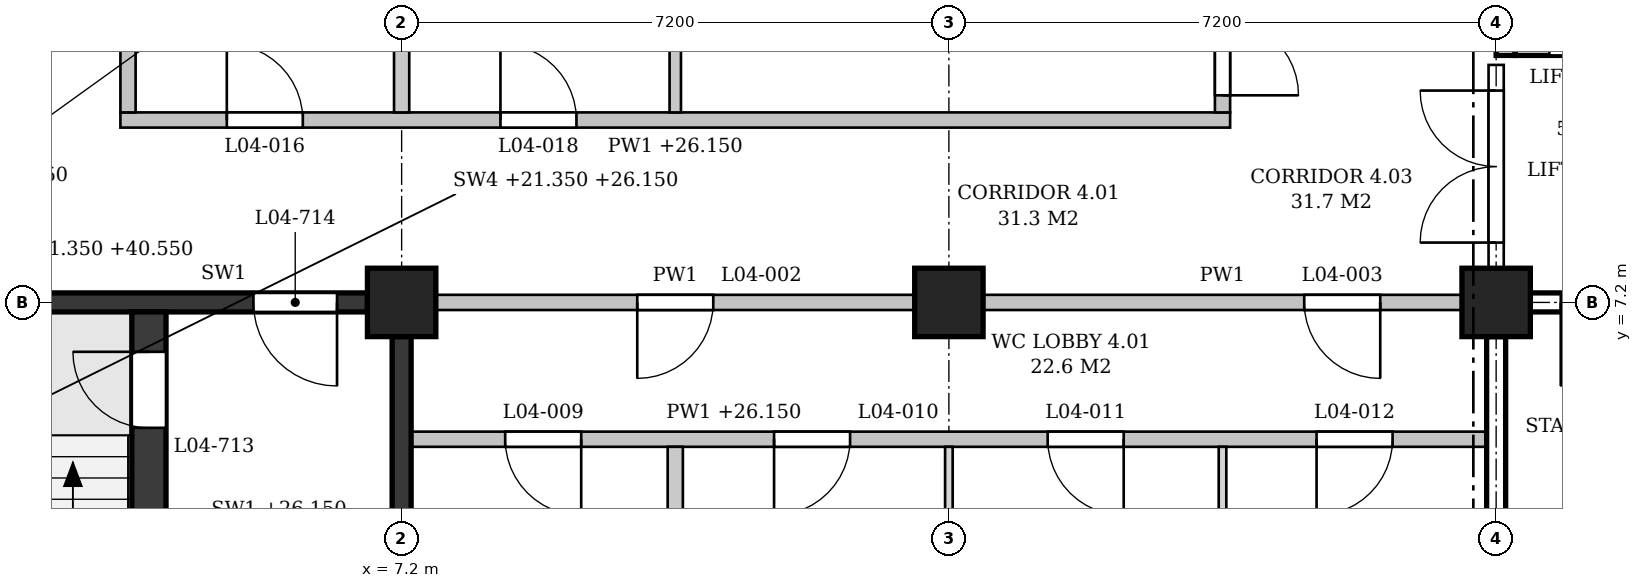
"""IFC4 building model, lengths in metres.
Left out: names, types, materials, properties, quantities, classifications, styles, units other than length and angle.
Written with IfcOpenShell. Run it as: python <this file> out.ifc"""

import sys

from ifc_helpers import new_model, si_unit, direction, frame, frame_2d, origin, origin_2d, place, context, subcontext, project, spatial, polyline, rectangle, outline, extrude, element, fill, save


model = new_model("IFC4")
c1 = context("Model", 3, precision=1e-05, world=origin(), true_north=direction((0.0, 1.0)))
c2 = subcontext(c1, "Body", "Model", "MODEL_VIEW")
j1 = project(units=[si_unit("LENGTHUNIT", "METRE"), si_unit("PLANEANGLEUNIT", "RADIAN")], contexts=[c1])
p1 = place(None, origin())
s1 = spatial("IfcSite", under=j1, at=p1, CompositionType="ELEMENT")
p2 = place(p1, origin())
s2 = spatial("IfcBuilding", under=s1, at=p2, CompositionType="ELEMENT")
p3 = place(p2, frame((0.0, 0.0, 21.6)))
s3 = spatial("IfcBuildingStorey", under=s2, at=p3, CompositionType="ELEMENT", Elevation=21.6)
for number, where, z_axis, x_axis in (
    (1, (7.2, 7.2, 0.0), (0.0, 0.0, 1.0), (1.0, 0.0, 0.0)),
    (2, (14.4, 7.2, 0.0), (0.0, 0.0, 1.0), (1.0, 0.0, 0.0)),
    (3, (21.6, 7.2, 0.0), (0.0, 0.0, 1.0), (1.0, 0.0, 0.0)),
):
    element("IfcColumn", number, at=place(p3, frame(where, z_axis=z_axis, x_axis=x_axis)), inside=s3, PredefinedType="COLUMN", context=c2, shape_type="SweptSolid", body=[
        extrude(rectangle(XDim=0.9, YDim=0.9, at=origin_2d()), origin(), (0.0, 0.0, 1.0), 4.8),
    ])
p4 = place(p3, frame((0.45, 7.2, 0.0), z_axis=(0.0, 0.0, 1.0), x_axis=(1.0, 0.0, 0.0)))
e4 = element("IfcWall", 4, at=p4, inside=s3, PredefinedType="SHEAR", context=c2, shape_type="SweptSolid", body=[
    extrude(rectangle(XDim=6.3, YDim=0.25, at=frame_2d((3.15, 0.0))), origin(), (0.0, 0.0, 1.0), 3.8),
])
p5 = place(p4, frame((4.8, 0.0, 0.0)))
e5 = element("IfcOpeningElement", 5, at=p5, cuts=e4, PredefinedType="OPENING", context=c2, shape_type="SweptSolid", body=[
    extrude(rectangle(XDim=1.1, YDim=2.1, at=frame_2d((0.55, 1.05))), frame((0.0, 0.135, 0.0), z_axis=(0.0, -1.0, 0.0), x_axis=(1.0, 0.0, 0.0)), (0.0, 0.0, 1.0), 0.27),
])
p6 = place(p3, frame((7.2, 0.45, 0.0), z_axis=(0.0, 0.0, 1.0), x_axis=(0.0, 1.0, 0.0)))
e6 = element("IfcWall", 6, at=p6, inside=s3, PredefinedType="SHEAR", context=c2, shape_type="SweptSolid", body=[
    extrude(rectangle(XDim=6.3, YDim=0.25, at=frame_2d((3.15, 0.0))), origin(), (0.0, 0.0, 1.0), 3.8),
])
p7 = place(p3, frame((3.875, 0.225, 0.0), z_axis=(0.0, 0.0, 1.0), x_axis=(0.0, 1.0, 0.0)))
e7 = element("IfcWall", 7, at=p7, inside=s3, PredefinedType="SHEAR", context=c2, shape_type="SweptSolid", body=[
    extrude(rectangle(XDim=6.85, YDim=0.45, at=frame_2d((3.425, 0.0))), origin(), (0.0, 0.0, 1.0), 4.55),
])
p8 = place(p7, frame((5.325, 0.0, 0.0)))
e8 = element("IfcOpeningElement", 8, at=p8, cuts=e7, PredefinedType="OPENING", context=c2, shape_type="SweptSolid", body=[
    extrude(rectangle(XDim=1.0, YDim=2.1, at=frame_2d((0.5, 1.05))), frame((0.0, 0.235, 0.0), z_axis=(0.0, -1.0, 0.0), x_axis=(1.0, 0.0, 0.0)), (0.0, 0.0, 1.0), 0.47),
])
p9 = place(p3, frame((22.05, 7.2, 0.0), z_axis=(0.0, 0.0, 1.0), x_axis=(1.0, 0.0, 0.0)))
e9 = element("IfcWall", 9, at=p9, inside=s3, PredefinedType="SHEAR", context=c2, shape_type="SweptSolid", body=[
    extrude(rectangle(XDim=6.3, YDim=0.25, at=frame_2d((3.15, 0.0))), origin(), (0.0, 0.0, 1.0), 3.8),
])
p10 = place(p9, frame((0.4, 0.0, 0.0)))
e10 = element("IfcOpeningElement", 10, at=p10, cuts=e9, PredefinedType="OPENING", context=c2, shape_type="SweptSolid", body=[
    extrude(rectangle(XDim=1.1, YDim=2.1, at=frame_2d((0.55, 1.05))), frame((0.0, 0.135, 0.0), z_axis=(0.0, -1.0, 0.0), x_axis=(1.0, 0.0, 0.0)), (0.0, 0.0, 1.0), 0.27),
])
p11 = place(p3, frame((21.6, 0.45, 0.0), z_axis=(0.0, 0.0, 1.0), x_axis=(0.0, 1.0, 0.0)))
e11 = element("IfcWall", 11, at=p11, inside=s3, PredefinedType="SHEAR", context=c2, shape_type="SweptSolid", body=[
    extrude(rectangle(XDim=6.3, YDim=0.25, at=frame_2d((3.15, 0.0))), origin(), (0.0, 0.0, 1.0), 3.8),
])
p12 = place(p3, frame((21.725, 10.45, -0.25), z_axis=(0.0, 0.0, 1.0), x_axis=(0.0, 1.0, 0.0)))
e12 = element("IfcWall", 12, at=p12, inside=s3, PredefinedType="SHEAR", context=c2, shape_type="SweptSolid", body=[
    extrude(rectangle(XDim=3.5, YDim=0.25, at=frame_2d((1.75, 0.0))), origin(), (0.0, 0.0, 1.0), 4.05),
])
p13 = place(p3, frame((21.85, 10.575, -0.25), z_axis=(0.0, 0.0, 1.0), x_axis=(1.0, 0.0, 0.0)))
e13 = element("IfcWall", 13, at=p13, inside=s3, PredefinedType="SHEAR", context=c2, shape_type="SweptSolid", body=[
    extrude(rectangle(XDim=2.0, YDim=0.25, at=frame_2d((1.0, 0.0))), origin(), (0.0, 0.0, 1.0), 4.8),
])
p14 = place(p13, frame((0.45, 0.0, 0.25)))
e14 = element("IfcOpeningElement", 14, at=p14, cuts=e13, PredefinedType="OPENING", context=c2, shape_type="SweptSolid", body=[
    extrude(rectangle(XDim=1.1, YDim=2.1, at=frame_2d((0.55, 1.05))), frame((0.0, 0.135, 0.0), z_axis=(0.0, -1.0, 0.0), x_axis=(1.0, 0.0, 0.0)), (0.0, 0.0, 1.0), 0.27),
])
p15 = place(p3, frame((7.325, 5.4, 0.0), z_axis=(0.0, 0.0, 1.0), x_axis=(1.0, 0.0, 0.0)))
e15 = element("IfcWall", 15, at=p15, inside=s3, PredefinedType="PARTITIONING", context=c2, shape_type="SweptSolid", body=[
    extrude(outline(polyline([(0.0, 0.0), (14.15, 0.0), (14.15, 3.8), (14.025, 3.8), (14.025, 4.55), (7.325, 4.55), (7.325, 3.8), (6.825, 3.8), (6.825, 4.55), (0.125, 4.55), (0.125, 3.8), (0.0, 3.8), (0.0, 0.0)])), frame((0.0, 0.1, 0.0), z_axis=(0.0, -1.0, 0.0), x_axis=(1.0, 0.0, 0.0)), (0.0, 0.0, 1.0), 0.2),
])
p16 = place(p15, frame((1.238, 0.0, 0.0)))
e16 = element("IfcOpeningElement", 16, at=p16, cuts=e15, PredefinedType="OPENING", context=c2, shape_type="SweptSolid", body=[
    extrude(rectangle(XDim=1.0, YDim=2.1, at=frame_2d((0.5, 1.05))), frame((0.0, 0.11, 0.0), z_axis=(0.0, -1.0, 0.0), x_axis=(1.0, 0.0, 0.0)), (0.0, 0.0, 1.0), 0.22),
])
p17 = place(p15, frame((4.775, 0.0, 0.0)))
e17 = element("IfcOpeningElement", 17, at=p17, cuts=e15, PredefinedType="OPENING", context=c2, shape_type="SweptSolid", body=[
    extrude(rectangle(XDim=1.0, YDim=2.1, at=frame_2d((0.5, 1.05))), frame((0.0, 0.11, 0.0), z_axis=(0.0, -1.0, 0.0), x_axis=(1.0, 0.0, 0.0)), (0.0, 0.0, 1.0), 0.22),
])
p18 = place(p15, frame((8.375, 0.0, 0.0)))
e18 = element("IfcOpeningElement", 18, at=p18, cuts=e15, PredefinedType="OPENING", context=c2, shape_type="SweptSolid", body=[
    extrude(rectangle(XDim=1.0, YDim=2.1, at=frame_2d((0.5, 1.05))), frame((0.0, 0.11, 0.0), z_axis=(0.0, -1.0, 0.0), x_axis=(1.0, 0.0, 0.0)), (0.0, 0.0, 1.0), 0.22),
])
p19 = place(p15, frame((11.913, 0.0, 0.0)))
e19 = element("IfcOpeningElement", 19, at=p19, cuts=e15, PredefinedType="OPENING", context=c2, shape_type="SweptSolid", body=[
    extrude(rectangle(XDim=1.0, YDim=2.1, at=frame_2d((0.5, 1.05))), frame((0.0, 0.11, 0.0), z_axis=(0.0, -1.0, 0.0), x_axis=(1.0, 0.0, 0.0)), (0.0, 0.0, 1.0), 0.22),
])
p20 = place(p3, frame((7.65, 7.2, 0.0), z_axis=(0.0, 0.0, 1.0), x_axis=(1.0, 0.0, 0.0)))
e20 = element("IfcWall", 20, at=p20, inside=s3, PredefinedType="PARTITIONING", context=c2, shape_type="SweptSolid", body=[
    extrude(rectangle(XDim=6.3, YDim=0.2, at=frame_2d((3.15, 0.0))), origin(), (0.0, 0.0, 1.0), 3.8),
])
p21 = place(p20, frame((2.65, 0.0, 0.0)))
e21 = element("IfcOpeningElement", 21, at=p21, cuts=e20, PredefinedType="OPENING", context=c2, shape_type="SweptSolid", body=[
    extrude(rectangle(XDim=1.0, YDim=2.1, at=frame_2d((0.5, 1.05))), frame((0.0, 0.11, 0.0), z_axis=(0.0, -1.0, 0.0), x_axis=(1.0, 0.0, 0.0)), (0.0, 0.0, 1.0), 0.22),
])
p22 = place(p3, frame((14.85, 7.2, 0.0), z_axis=(0.0, 0.0, 1.0), x_axis=(1.0, 0.0, 0.0)))
e22 = element("IfcWall", 22, at=p22, inside=s3, PredefinedType="PARTITIONING", context=c2, shape_type="SweptSolid", body=[
    extrude(rectangle(XDim=6.3, YDim=0.2, at=frame_2d((3.15, 0.0))), origin(), (0.0, 0.0, 1.0), 3.8),
])
p23 = place(p22, frame((4.225, 0.0, 0.0)))
e23 = element("IfcOpeningElement", 23, at=p23, cuts=e22, PredefinedType="OPENING", context=c2, shape_type="SweptSolid", body=[
    extrude(rectangle(XDim=1.0, YDim=2.1, at=frame_2d((0.5, 1.05))), frame((0.0, 0.11, 0.0), z_axis=(0.0, -1.0, 0.0), x_axis=(1.0, 0.0, 0.0)), (0.0, 0.0, 1.0), 0.22),
])
p24 = place(p3, frame((3.5, 9.6, 0.0), z_axis=(0.0, 0.0, 1.0), x_axis=(1.0, 0.0, 0.0)))
e24 = element("IfcWall", 24, at=p24, inside=s3, PredefinedType="PARTITIONING", context=c2, shape_type="SweptSolid", body=[
    extrude(outline(polyline([(0.0, 0.0), (14.6, 0.0), (14.6, 4.55), (11.15, 4.55), (11.15, 3.8), (10.65, 3.8), (10.65, 4.55), (3.95, 4.55), (3.95, 3.8), (3.45, 3.8), (3.45, 4.55), (0.0, 4.55), (0.0, 0.0)])), frame((0.0, 0.1, 0.0), z_axis=(0.0, -1.0, 0.0), x_axis=(1.0, 0.0, 0.0)), (0.0, 0.0, 1.0), 0.2),
])
p25 = place(p24, frame((1.4, 0.0, 0.0)))
e25 = element("IfcOpeningElement", 25, at=p25, cuts=e24, PredefinedType="OPENING", context=c2, shape_type="SweptSolid", body=[
    extrude(rectangle(XDim=1.0, YDim=2.1, at=frame_2d((0.5, 1.05))), frame((0.0, 0.11, 0.0), z_axis=(0.0, -1.0, 0.0), x_axis=(1.0, 0.0, 0.0)), (0.0, 0.0, 1.0), 0.22),
])
p26 = place(p24, frame((5.0, 0.0, 0.0)))
e26 = element("IfcOpeningElement", 26, at=p26, cuts=e24, PredefinedType="OPENING", context=c2, shape_type="SweptSolid", body=[
    extrude(rectangle(XDim=1.0, YDim=2.1, at=frame_2d((0.5, 1.05))), frame((0.0, 0.11, 0.0), z_axis=(0.0, -1.0, 0.0), x_axis=(1.0, 0.0, 0.0)), (0.0, 0.0, 1.0), 0.22),
])
p27 = place(p3, frame((3.6, 9.7, 0.0), z_axis=(0.0, 0.0, 1.0), x_axis=(0.0, 1.0, 0.0)))
e27 = element("IfcWall", 27, at=p27, inside=s3, PredefinedType="PARTITIONING", context=c2, shape_type="SweptSolid", body=[
    extrude(rectangle(XDim=1.1, YDim=0.2, at=frame_2d((0.55, 0.0))), origin(), (0.0, 0.0, 1.0), 4.55),
])
p28 = place(p3, frame((7.2, 9.7, 0.0), z_axis=(0.0, 0.0, 1.0), x_axis=(0.0, 1.0, 0.0)))
e28 = element("IfcWall", 28, at=p28, inside=s3, PredefinedType="PARTITIONING", context=c2, shape_type="SweptSolid", body=[
    extrude(rectangle(XDim=4.25, YDim=0.2, at=frame_2d((2.125, 0.0))), origin(), (0.0, 0.0, 1.0), 3.8),
])
p29 = place(p3, frame((10.8, 0.15, 0.0), z_axis=(0.0, 0.0, 1.0), x_axis=(0.0, 1.0, 0.0)))
e29 = element("IfcWall", 29, at=p29, inside=s3, PredefinedType="PARTITIONING", context=c2, shape_type="SweptSolid", body=[
    extrude(outline(polyline([(0.0, 0.0), (5.15, 0.0), (5.15, 4.55), (0.1, 4.55), (0.1, 3.95), (0.0, 3.95), (0.0, 0.0)])), frame((0.0, 0.1, 0.0), z_axis=(0.0, -1.0, 0.0), x_axis=(1.0, 0.0, 0.0)), (0.0, 0.0, 1.0), 0.2),
])
p30 = place(p3, frame((10.8, 9.7, 0.0), z_axis=(0.0, 0.0, 1.0), x_axis=(0.0, 1.0, 0.0)))
e30 = element("IfcWall", 30, at=p30, inside=s3, PredefinedType="PARTITIONING", context=c2, shape_type="SweptSolid", body=[
    extrude(rectangle(XDim=11.75, YDim=0.15, at=frame_2d((5.875, 0.0))), origin(), (0.0, 0.0, 1.0), 3.8),
])
p31 = place(p3, frame((14.4, 0.45, 0.0), z_axis=(0.0, 0.0, 1.0), x_axis=(0.0, 1.0, 0.0)))
e31 = element("IfcWall", 31, at=p31, inside=s3, PredefinedType="PARTITIONING", context=c2, shape_type="SweptSolid", body=[
    extrude(rectangle(XDim=4.85, YDim=0.1, at=frame_2d((2.425, 0.0))), origin(), (0.0, 0.0, 1.0), 3.8),
])
p32 = place(p3, frame((18.0, 0.15, 0.0), z_axis=(0.0, 0.0, 1.0), x_axis=(0.0, 1.0, 0.0)))
e32 = element("IfcWall", 32, at=p32, inside=s3, PredefinedType="PARTITIONING", context=c2, shape_type="SweptSolid", body=[
    extrude(rectangle(XDim=5.15, YDim=0.1, at=frame_2d((2.575, 0.0))), origin(), (0.0, 0.0, 1.0), 3.8),
])
p33 = place(p3, frame((18.0, 9.7, 0.0), z_axis=(0.0, 0.0, 1.0), x_axis=(0.0, 1.0, 0.0)))
e33 = element("IfcWall", 33, at=p33, inside=s3, PredefinedType="PARTITIONING", context=c2, shape_type="SweptSolid", body=[
    extrude(outline(polyline([(0.0, 0.0), (7.1, 0.0), (7.1, 4.55), (4.95, 4.55), (4.95, 3.8), (4.45, 3.8), (4.45, 4.55), (0.0, 4.55), (0.0, 0.0)])), frame((0.0, 0.1, 0.0), z_axis=(0.0, -1.0, 0.0), x_axis=(1.0, 0.0, 0.0)), (0.0, 0.0, 1.0), 0.2),
])
p34 = place(p33, frame((2.55, 0.0, 0.0)))
e34 = element("IfcOpeningElement", 34, at=p34, cuts=e33, PredefinedType="OPENING", context=c2, shape_type="SweptSolid", body=[
    extrude(rectangle(XDim=2.0, YDim=2.1, at=frame_2d((1.0, 1.05))), frame((0.0, 0.11, 0.0), z_axis=(0.0, -1.0, 0.0), x_axis=(1.0, 0.0, 0.0)), (0.0, 0.0, 1.0), 0.22),
])
p35 = place(p33, frame((0.225, 0.0, 0.0)))
e35 = element("IfcOpeningElement", 35, at=p35, cuts=e33, PredefinedType="OPENING", context=c2, shape_type="SweptSolid", body=[
    extrude(rectangle(XDim=2.0, YDim=2.1, at=frame_2d((1.0, 1.05))), frame((0.0, 0.11, 0.0), z_axis=(0.0, -1.0, 0.0), x_axis=(1.0, 0.0, 0.0)), (0.0, 0.0, 1.0), 0.22),
])
p36 = place(p3, frame((21.6, 7.65, 0.0), z_axis=(0.0, 0.0, 1.0), x_axis=(0.0, 1.0, 0.0)))
e36 = element("IfcWall", 36, at=p36, inside=s3, PredefinedType="PARTITIONING", context=c2, shape_type="SweptSolid", body=[
    extrude(rectangle(XDim=2.675, YDim=0.2, at=frame_2d((1.337, 0.0))), origin(), (0.0, 0.0, 1.0), 3.8),
])
p37 = place(p36, frame((0.337, 0.0, 0.0)))
e37 = element("IfcOpeningElement", 37, at=p37, cuts=e36, PredefinedType="OPENING", context=c2, shape_type="SweptSolid", body=[
    extrude(rectangle(XDim=2.0, YDim=2.4, at=frame_2d((1.0, 1.2))), frame((0.0, 0.11, 0.0), z_axis=(0.0, -1.0, 0.0), x_axis=(1.0, 0.0, 0.0)), (0.0, 0.0, 1.0), 0.22),
])
p38 = place(p8, origin())
e38 = element("IfcDoor", 38, at=p38, inside=s3, OperationType="SINGLE_SWING_RIGHT", PredefinedType="DOOR", context=c2, shape_type="SweptSolid", body=[
    extrude(rectangle(XDim=1.0, YDim=2.1, at=frame_2d((0.5, 1.05))), frame((0.0, 0.025, 0.0), z_axis=(0.0, -1.0, 0.0), x_axis=(1.0, 0.0, 0.0)), (0.0, 0.0, 1.0), 0.05),
])
fill(e8, e38)
p39 = place(p5, frame((1.1, 0.0, 0.0), z_axis=(0.0, 0.0, 1.0), x_axis=(-1.0, 0.0, 0.0)))
e39 = element("IfcDoor", 39, at=p39, inside=s3, OperationType="SINGLE_SWING_LEFT", PredefinedType="DOOR", context=c2, shape_type="SweptSolid", body=[
    extrude(rectangle(XDim=1.1, YDim=2.1, at=frame_2d((0.55, 1.05))), frame((0.0, 0.025, 0.0), z_axis=(0.0, -1.0, 0.0), x_axis=(1.0, 0.0, 0.0)), (0.0, 0.0, 1.0), 0.05),
])
fill(e5, e39)
p40 = place(p10, frame((1.1, 0.0, 0.0), z_axis=(0.0, 0.0, 1.0), x_axis=(-1.0, 0.0, 0.0)))
e40 = element("IfcDoor", 40, at=p40, inside=s3, OperationType="SINGLE_SWING_RIGHT", PredefinedType="DOOR", context=c2, shape_type="SweptSolid", body=[
    extrude(rectangle(XDim=1.1, YDim=2.1, at=frame_2d((0.55, 1.05))), frame((0.0, 0.025, 0.0), z_axis=(0.0, -1.0, 0.0), x_axis=(1.0, 0.0, 0.0)), (0.0, 0.0, 1.0), 0.05),
])
fill(e10, e40)
p41 = place(p37, origin())
e41 = element("IfcDoor", 41, at=p41, inside=s3, OperationType="DOUBLE_DOOR_SINGLE_SWING", PredefinedType="DOOR", context=c2, shape_type="SweptSolid", body=[
    extrude(rectangle(XDim=2.0, YDim=2.4, at=frame_2d((1.0, 1.2))), frame((0.0, 0.025, 0.0), z_axis=(0.0, -1.0, 0.0), x_axis=(1.0, 0.0, 0.0)), (0.0, 0.0, 1.0), 0.05),
])
fill(e37, e41)
p42 = place(p21, frame((1.0, 0.0, 0.0), z_axis=(0.0, 0.0, 1.0), x_axis=(-1.0, 0.0, 0.0)))
e42 = element("IfcDoor", 42, at=p42, inside=s3, OperationType="SINGLE_SWING_RIGHT", PredefinedType="DOOR", context=c2, shape_type="SweptSolid", body=[
    extrude(rectangle(XDim=1.0, YDim=2.1, at=frame_2d((0.5, 1.05))), frame((0.0, 0.025, 0.0), z_axis=(0.0, -1.0, 0.0), x_axis=(1.0, 0.0, 0.0)), (0.0, 0.0, 1.0), 0.05),
])
fill(e21, e42)
p43 = place(p23, frame((1.0, 0.0, 0.0), z_axis=(0.0, 0.0, 1.0), x_axis=(-1.0, 0.0, 0.0)))
e43 = element("IfcDoor", 43, at=p43, inside=s3, OperationType="SINGLE_SWING_LEFT", PredefinedType="DOOR", context=c2, shape_type="SweptSolid", body=[
    extrude(rectangle(XDim=1.0, YDim=2.1, at=frame_2d((0.5, 1.05))), frame((0.0, 0.025, 0.0), z_axis=(0.0, -1.0, 0.0), x_axis=(1.0, 0.0, 0.0)), (0.0, 0.0, 1.0), 0.05),
])
fill(e23, e43)
p44 = place(p16, frame((1.0, 0.0, 0.0), z_axis=(0.0, 0.0, 1.0), x_axis=(-1.0, 0.0, 0.0)))
e44 = element("IfcDoor", 44, at=p44, inside=s3, OperationType="SINGLE_SWING_LEFT", PredefinedType="DOOR", context=c2, shape_type="SweptSolid", body=[
    extrude(rectangle(XDim=1.0, YDim=2.1, at=frame_2d((0.5, 1.05))), frame((0.0, 0.025, 0.0), z_axis=(0.0, -1.0, 0.0), x_axis=(1.0, 0.0, 0.0)), (0.0, 0.0, 1.0), 0.05),
])
fill(e16, e44)
p45 = place(p17, frame((1.0, 0.0, 0.0), z_axis=(0.0, 0.0, 1.0), x_axis=(-1.0, 0.0, 0.0)))
e45 = element("IfcDoor", 45, at=p45, inside=s3, OperationType="SINGLE_SWING_RIGHT", PredefinedType="DOOR", context=c2, shape_type="SweptSolid", body=[
    extrude(rectangle(XDim=1.0, YDim=2.1, at=frame_2d((0.5, 1.05))), frame((0.0, 0.025, 0.0), z_axis=(0.0, -1.0, 0.0), x_axis=(1.0, 0.0, 0.0)), (0.0, 0.0, 1.0), 0.05),
])
fill(e17, e45)
p46 = place(p18, frame((1.0, 0.0, 0.0), z_axis=(0.0, 0.0, 1.0), x_axis=(-1.0, 0.0, 0.0)))
e46 = element("IfcDoor", 46, at=p46, inside=s3, OperationType="SINGLE_SWING_LEFT", PredefinedType="DOOR", context=c2, shape_type="SweptSolid", body=[
    extrude(rectangle(XDim=1.0, YDim=2.1, at=frame_2d((0.5, 1.05))), frame((0.0, 0.025, 0.0), z_axis=(0.0, -1.0, 0.0), x_axis=(1.0, 0.0, 0.0)), (0.0, 0.0, 1.0), 0.05),
])
fill(e18, e46)
p47 = place(p19, frame((1.0, 0.0, 0.0), z_axis=(0.0, 0.0, 1.0), x_axis=(-1.0, 0.0, 0.0)))
e47 = element("IfcDoor", 47, at=p47, inside=s3, OperationType="SINGLE_SWING_RIGHT", PredefinedType="DOOR", context=c2, shape_type="SweptSolid", body=[
    extrude(rectangle(XDim=1.0, YDim=2.1, at=frame_2d((0.5, 1.05))), frame((0.0, 0.025, 0.0), z_axis=(0.0, -1.0, 0.0), x_axis=(1.0, 0.0, 0.0)), (0.0, 0.0, 1.0), 0.05),
])
fill(e19, e47)
p48 = place(p25, origin())
e48 = element("IfcDoor", 48, at=p48, inside=s3, OperationType="SINGLE_SWING_LEFT", PredefinedType="DOOR", context=c2, shape_type="SweptSolid", body=[
    extrude(rectangle(XDim=1.0, YDim=2.1, at=frame_2d((0.5, 1.05))), frame((0.0, 0.025, 0.0), z_axis=(0.0, -1.0, 0.0), x_axis=(1.0, 0.0, 0.0)), (0.0, 0.0, 1.0), 0.05),
])
fill(e25, e48)
p49 = place(p26, origin())
e49 = element("IfcDoor", 49, at=p49, inside=s3, OperationType="SINGLE_SWING_LEFT", PredefinedType="DOOR", context=c2, shape_type="SweptSolid", body=[
    extrude(rectangle(XDim=1.0, YDim=2.1, at=frame_2d((0.5, 1.05))), frame((0.0, 0.025, 0.0), z_axis=(0.0, -1.0, 0.0), x_axis=(1.0, 0.0, 0.0)), (0.0, 0.0, 1.0), 0.05),
])
fill(e26, e49)
p50 = place(p35, origin())
e50 = element("IfcDoor", 50, at=p50, inside=s3, OperationType="DOUBLE_DOOR_SINGLE_SWING", PredefinedType="DOOR", context=c2, shape_type="SweptSolid", body=[
    extrude(rectangle(XDim=2.0, YDim=2.1, at=frame_2d((1.0, 1.05))), frame((0.0, 0.025, 0.0), z_axis=(0.0, -1.0, 0.0), x_axis=(1.0, 0.0, 0.0)), (0.0, 0.0, 1.0), 0.05),
])
fill(e35, e50)
save(model, sys.argv[1])
